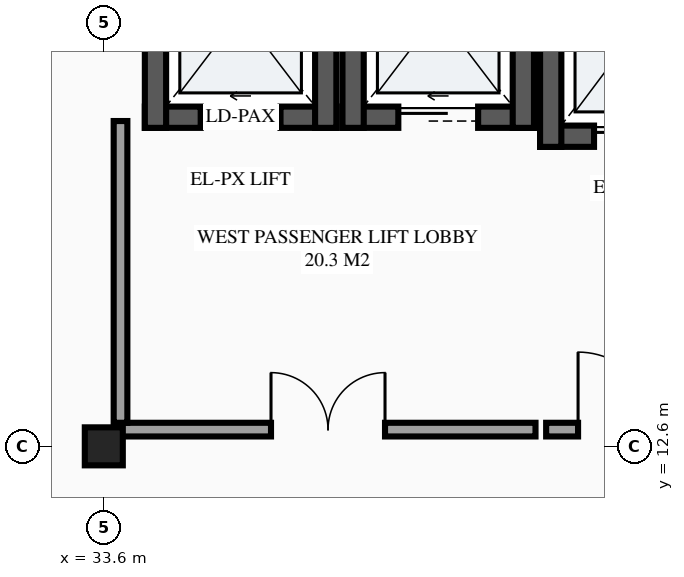
"""IFC4 building model, lengths in metres.
Left out: names, types, materials, properties, quantities, classifications, styles, units other than length and angle.
Written with IfcOpenShell. Run it as: python <this file> out.ifc"""

import sys

from ifc_helpers import new_model, si_unit, direction, frame, frame_2d, origin, origin_2d, place, context, subcontext, project, spatial, rectangle, extrude, element, fill, save


model = new_model("IFC4")
c1 = context("Model", 3, precision=1e-05, world=origin(), true_north=direction((0.0, 1.0)))
c2 = subcontext(c1, "Body", "Model", "MODEL_VIEW")
j1 = project(units=[si_unit("LENGTHUNIT", "METRE"), si_unit("PLANEANGLEUNIT", "RADIAN")], contexts=[c1])
p1 = place(None, origin())
s1 = spatial("IfcSite", under=j1, at=p1, CompositionType="ELEMENT")
p2 = place(p1, origin())
s2 = spatial("IfcBuilding", under=s1, at=p2, CompositionType="ELEMENT")
p3 = place(p2, frame((0.0, 0.0, 39.9)))
s3 = spatial("IfcBuildingStorey", under=s2, at=p3, CompositionType="ELEMENT", Elevation=39.9)
p4 = place(p3, frame((33.6, 12.6, 0.0), z_axis=(0.0, 0.0, 1.0), x_axis=(1.0, 0.0, 0.0)))
e1 = element("IfcColumn", 1, at=p4, inside=s3, PredefinedType="COLUMN", context=c2, shape_type="SweptSolid", body=[
    extrude(rectangle(XDim=0.5, YDim=0.5, at=origin_2d()), origin(), (0.0, 0.0, 1.0), 3.6),
])
p5 = place(p3, frame((34.14, 16.93, 0.0), z_axis=(0.0, 0.0, 1.0), x_axis=(1.0, 0.0, 0.0)))
e2 = element("IfcWall", 2, at=p5, inside=s3, PredefinedType="SHEAR", context=c2, shape_type="SweptSolid", body=[
    extrude(rectangle(XDim=2.52, YDim=0.28, at=frame_2d((1.26, 0.0))), origin(), (0.0, 0.0, 1.0), 3.6),
])
p6 = place(p5, frame((0.735, 0.0, 0.0)))
e3 = element("IfcOpeningElement", 3, at=p6, cuts=e2, PredefinedType="OPENING", context=c2, shape_type="SweptSolid", body=[
    extrude(rectangle(XDim=1.05, YDim=2.2, at=frame_2d((0.525, 1.1))), frame((0.0, 0.15, 0.0), z_axis=(0.0, -1.0, 0.0), x_axis=(1.0, 0.0, 0.0)), (0.0, 0.0, 1.0), 0.3),
])
for number, where, z_axis, x_axis in (
    (4, (36.52, 16.79, 0.0), (0.0, 0.0, 1.0), (0.0, 1.0, 0.0)),
    (5, (34.28, 19.81, 0.0), (0.0, 0.0, 1.0), (0.0, -1.0, 0.0)),
):
    element("IfcWall", number, at=place(p3, frame(where, z_axis=z_axis, x_axis=x_axis)), inside=s3, PredefinedType="SHEAR", context=c2, shape_type="SweptSolid", body=[
        extrude(rectangle(XDim=3.02, YDim=0.28, at=frame_2d((1.51, 0.0))), origin(), (0.0, 0.0, 1.0), 3.6),
    ])
p7 = place(p3, frame((36.74, 16.93, 0.0), z_axis=(0.0, 0.0, 1.0), x_axis=(1.0, 0.0, 0.0)))
e6 = element("IfcWall", 6, at=p7, inside=s3, PredefinedType="SHEAR", context=c2, shape_type="SweptSolid", body=[
    extrude(rectangle(XDim=2.52, YDim=0.28, at=frame_2d((1.26, 0.0))), origin(), (0.0, 0.0, 1.0), 3.6),
])
p8 = place(p7, frame((0.735, 0.0, 0.0)))
e7 = element("IfcOpeningElement", 7, at=p8, cuts=e6, PredefinedType="OPENING", context=c2, shape_type="SweptSolid", body=[
    extrude(rectangle(XDim=1.05, YDim=2.2, at=frame_2d((0.525, 1.1))), frame((0.0, 0.15, 0.0), z_axis=(0.0, -1.0, 0.0), x_axis=(1.0, 0.0, 0.0)), (0.0, 0.0, 1.0), 0.3),
])
for number, where, z_axis, x_axis in (
    (8, (39.12, 16.79, 0.0), (0.0, 0.0, 1.0), (0.0, 1.0, 0.0)),
    (9, (36.88, 19.81, 0.0), (0.0, 0.0, 1.0), (0.0, -1.0, 0.0)),
):
    element("IfcWall", number, at=place(p3, frame(where, z_axis=z_axis, x_axis=x_axis)), inside=s3, PredefinedType="SHEAR", context=c2, shape_type="SweptSolid", body=[
        extrude(rectangle(XDim=3.02, YDim=0.28, at=frame_2d((1.51, 0.0))), origin(), (0.0, 0.0, 1.0), 3.6),
    ])
p9 = place(p3, frame((39.34, 16.68, 0.0), z_axis=(0.0, 0.0, 1.0), x_axis=(1.0, 0.0, 0.0)))
e10 = element("IfcWall", 10, at=p9, inside=s3, PredefinedType="SHEAR", context=c2, shape_type="SweptSolid", body=[
    extrude(rectangle(XDim=2.72, YDim=0.28, at=frame_2d((1.36, 0.0))), origin(), (0.0, 0.0, 1.0), 3.6),
])
p10 = place(p9, frame((0.71, 0.0, 0.0)))
e11 = element("IfcOpeningElement", 11, at=p10, cuts=e10, PredefinedType="OPENING", context=c2, shape_type="SweptSolid", body=[
    extrude(rectangle(XDim=1.3, YDim=2.25, at=frame_2d((0.65, 1.125))), frame((0.0, 0.15, 0.0), z_axis=(0.0, -1.0, 0.0), x_axis=(1.0, 0.0, 0.0)), (0.0, 0.0, 1.0), 0.3),
])
p11 = place(p3, frame((39.48, 19.86, 0.0), z_axis=(0.0, 0.0, 1.0), x_axis=(0.0, -1.0, 0.0)))
e12 = element("IfcWall", 12, at=p11, inside=s3, PredefinedType="SHEAR", context=c2, shape_type="SweptSolid", body=[
    extrude(rectangle(XDim=3.32, YDim=0.28, at=frame_2d((1.66, 0.0))), origin(), (0.0, 0.0, 1.0), 3.6),
])
p12 = place(p3, frame((33.82, 12.82, 0.0), z_axis=(0.0, 0.0, 1.0), x_axis=(1.0, 0.0, 0.0)))
e13 = element("IfcWall", 13, at=p12, inside=s3, PredefinedType="PARTITIONING", context=c2, shape_type="SweptSolid", body=[
    extrude(rectangle(XDim=5.46, YDim=0.18, at=frame_2d((2.73, 0.0))), origin(), (0.0, 0.0, 1.0), 3.375),
])
p13 = place(p12, frame((1.98, 0.0, 0.0)))
e14 = element("IfcOpeningElement", 14, at=p13, cuts=e13, PredefinedType="OPENING", context=c2, shape_type="SweptSolid", body=[
    extrude(rectangle(XDim=1.5, YDim=2.15, at=frame_2d((0.75, 1.075))), frame((0.0, 0.1, 0.0), z_axis=(0.0, -1.0, 0.0), x_axis=(1.0, 0.0, 0.0)), (0.0, 0.0, 1.0), 0.2),
])
p14 = place(p3, frame((33.82, 12.91, 0.0), z_axis=(0.0, 0.0, 1.0), x_axis=(0.0, 1.0, 0.0)))
e15 = element("IfcWall", 15, at=p14, inside=s3, PredefinedType="PARTITIONING", context=c2, shape_type="SweptSolid", body=[
    extrude(rectangle(XDim=3.97, YDim=0.18, at=frame_2d((1.985, 0.0))), origin(), (0.0, 0.0, 1.0), 2.63),
])
p15 = place(p3, frame((39.42, 12.82, 0.0), z_axis=(0.0, 0.0, 1.0), x_axis=(1.0, 0.0, 0.0)))
e16 = element("IfcWall", 16, at=p15, inside=s3, PredefinedType="PARTITIONING", context=c2, shape_type="SweptSolid", body=[
    extrude(rectangle(XDim=2.83, YDim=0.18, at=frame_2d((1.415, 0.0))), origin(), (0.0, 0.0, 1.0), 3.375),
])
p16 = place(p15, frame((0.42, 0.0, 0.0)))
e17 = element("IfcOpeningElement", 17, at=p16, cuts=e16, PredefinedType="OPENING", context=c2, shape_type="SweptSolid", body=[
    extrude(rectangle(XDim=1.02, YDim=2.15, at=frame_2d((0.51, 1.075))), frame((0.0, 0.1, 0.0), z_axis=(0.0, -1.0, 0.0), x_axis=(1.0, 0.0, 0.0)), (0.0, 0.0, 1.0), 0.2),
])
p17 = place(p6, origin())
e18 = element("IfcDoor", 18, at=p17, inside=s3, OperationType="SLIDING_TO_LEFT", PredefinedType="DOOR", context=c2, shape_type="SweptSolid", body=[
    extrude(rectangle(XDim=1.05, YDim=2.2, at=frame_2d((0.525, 1.1))), frame((0.0, 0.025, 0.0), z_axis=(0.0, -1.0, 0.0), x_axis=(1.0, 0.0, 0.0)), (0.0, 0.0, 1.0), 0.05),
])
fill(e3, e18)
p18 = place(p8, origin())
e19 = element("IfcDoor", 19, at=p18, inside=s3, OperationType="SLIDING_TO_LEFT", PredefinedType="DOOR", context=c2, shape_type="SweptSolid", body=[
    extrude(rectangle(XDim=1.05, YDim=2.2, at=frame_2d((0.525, 1.1))), frame((0.0, 0.025, 0.0), z_axis=(0.0, -1.0, 0.0), x_axis=(1.0, 0.0, 0.0)), (0.0, 0.0, 1.0), 0.05),
])
fill(e7, e19)
p19 = place(p10, origin())
e20 = element("IfcDoor", 20, at=p19, inside=s3, OperationType="SLIDING_TO_LEFT", PredefinedType="DOOR", context=c2, shape_type="SweptSolid", body=[
    extrude(rectangle(XDim=1.3, YDim=2.25, at=frame_2d((0.65, 1.125))), frame((0.0, 0.025, 0.0), z_axis=(0.0, -1.0, 0.0), x_axis=(1.0, 0.0, 0.0)), (0.0, 0.0, 1.0), 0.05),
])
fill(e11, e20)
p20 = place(p13, origin())
e21 = element("IfcDoor", 21, at=p20, inside=s3, OperationType="DOUBLE_DOOR_SINGLE_SWING", PredefinedType="DOOR", context=c2, shape_type="SweptSolid", body=[
    extrude(rectangle(XDim=1.5, YDim=2.15, at=frame_2d((0.75, 1.075))), frame((0.0, 0.025, 0.0), z_axis=(0.0, -1.0, 0.0), x_axis=(1.0, 0.0, 0.0)), (0.0, 0.0, 1.0), 0.05),
])
fill(e14, e21)
p21 = place(p16, origin())
e22 = element("IfcDoor", 22, at=p21, inside=s3, OperationType="SINGLE_SWING_LEFT", PredefinedType="DOOR", context=c2, shape_type="SweptSolid", body=[
    extrude(rectangle(XDim=1.02, YDim=2.15, at=frame_2d((0.51, 1.075))), frame((0.0, 0.025, 0.0), z_axis=(0.0, -1.0, 0.0), x_axis=(1.0, 0.0, 0.0)), (0.0, 0.0, 1.0), 0.05),
])
fill(e17, e22)
save(model, sys.argv[1])
